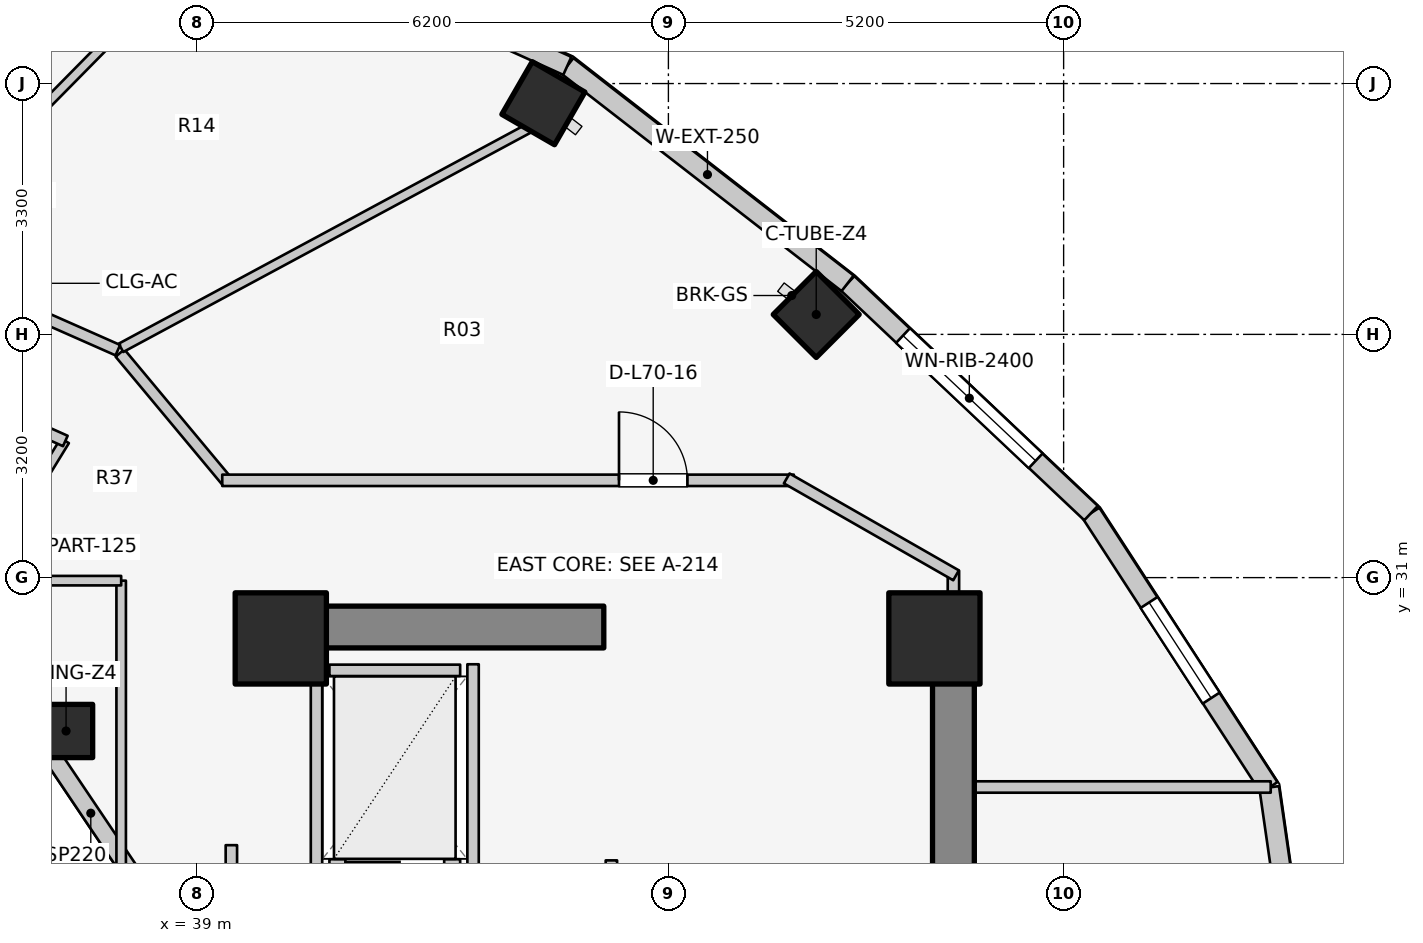
"""IFC4 building model, lengths in metres.
Left out: names, types, materials, properties, quantities, classifications, styles, units other than length and angle.
Written with IfcOpenShell. Run it as: python <this file> out.ifc"""

import sys

from ifc_helpers import new_model, si_unit, direction, frame, frame_2d, origin, origin_2d, place, context, subcontext, project, spatial, rectangle, extrude, element, fill, save


model = new_model("IFC4")
c1 = context("Model", 3, precision=1e-05, world=origin(), true_north=direction((0.0, 1.0)))
c2 = subcontext(c1, "Body", "Model", "MODEL_VIEW")
j1 = project(units=[si_unit("LENGTHUNIT", "METRE"), si_unit("PLANEANGLEUNIT", "RADIAN")], contexts=[c1])
p1 = place(None, origin())
s1 = spatial("IfcSite", under=j1, at=p1, CompositionType="ELEMENT")
p2 = place(p1, origin())
s2 = spatial("IfcBuilding", under=s1, at=p2, CompositionType="ELEMENT")
p3 = place(p2, frame((0.0, 0.0, 229.5)))
s3 = spatial("IfcBuildingStorey", under=s2, at=p3, CompositionType="ELEMENT", Elevation=229.5)
p4 = place(p3, frame((48.95, 17.05, 0.0), z_axis=(0.0, 0.0, 1.0), x_axis=(0.0, 1.0, 0.0)))
e1 = element("IfcWall", 1, at=p4, inside=s3, PredefinedType="SHEAR", context=c2, shape_type="SweptSolid", body=[
    extrude(rectangle(XDim=12.8, YDim=0.55, at=frame_2d((6.4, 0.0))), origin(), (0.0, 0.0, 1.0), 3.1),
])
p5 = place(p3, frame((39.85, 30.35, 0.0), z_axis=(0.0, 0.0, 1.0), x_axis=(1.0, 0.0, 0.0)))
e2 = element("IfcWall", 2, at=p5, inside=s3, PredefinedType="SHEAR", context=c2, shape_type="SweptSolid", body=[
    extrude(rectangle(XDim=4.5, YDim=0.55, at=frame_2d((2.25, 0.0))), origin(), (0.0, 0.0, 1.0), 3.1),
])
for number, where, z_axis, x_axis in (
    (3, (48.7, 30.2, 0.0), (0.0, 0.0, 1.0), (1.0, 0.0, 0.0)),
    (4, (40.1, 30.2, 0.0), (0.0, 0.0, 1.0), (1.0, 0.0, 0.0)),
):
    element("IfcColumn", number, at=place(p3, frame(where, z_axis=z_axis, x_axis=x_axis)), inside=s3, PredefinedType="COLUMN", context=c2, shape_type="SweptSolid", body=[
        extrude(rectangle(XDim=1.2, YDim=1.2, at=origin_2d()), origin(), (0.0, 0.0, 1.0), 3.1),
    ])
p6 = place(p3, frame((37.275, 28.982, 0.0), z_axis=(0.0, 0.0, 1.0), x_axis=(1.0, 0.0, 0.0)))
e5 = element("IfcColumn", 5, at=p6, inside=s3, PredefinedType="COLUMN", context=c2, shape_type="SweptSolid", body=[
    extrude(rectangle(XDim=0.7, YDim=0.7, at=origin_2d()), origin(), (0.0, 0.0, 1.0), 3.1),
])
for number, where, z_axis, x_axis in (
    (6, (47.145, 34.462, 0.0), (0.0, 0.0, 1.0), (0.707, 0.707, 0.0)),
    (7, (43.555, 37.241, 0.0), (0.0, 0.0, 1.0), (0.5, 0.866, 0.0)),
):
    element("IfcColumn", number, at=place(p3, frame(where, z_axis=z_axis, x_axis=x_axis)), inside=s3, PredefinedType="COLUMN", context=c2, shape_type="SweptSolid", body=[
        extrude(rectangle(XDim=0.8, YDim=0.8, at=origin_2d()), origin(), (0.0, 0.0, 1.0), 3.1),
    ])
p7 = place(p3, frame((38.166, 27.06, 0.0), z_axis=(0.0, 0.0, 1.0), x_axis=(-0.558197800898, 0.829707909492, 0.0)))
e8 = element("IfcWall", 8, at=p7, inside=s3, PredefinedType="STANDARD", context=c2, shape_type="SweptSolid", body=[
    extrude(rectangle(XDim=2.027, YDim=0.23, at=frame_2d((1.013, 0.0))), origin(), (0.0, 0.0, 1.0), 2.16),
])
p8 = place(p3, frame((37.035, 28.742, 0.0), z_axis=(0.0, 0.0, 1.0), x_axis=(-0.752576694707, 0.658504607869, 0.0)))
e9 = element("IfcWall", 9, at=p8, inside=s3, PredefinedType="STANDARD", context=c2, shape_type="SweptSolid", body=[
    extrude(rectangle(XDim=1.959, YDim=0.23, at=frame_2d((0.98, 0.0))), origin(), (0.0, 0.0, 1.0), 2.16),
])
p9 = place(p3, frame((53.86, 23.0, 0.0), z_axis=(0.0, 0.0, 1.0), x_axis=(-0.142712754019, 0.989764148593, 0.0)))
e10 = element("IfcWall", 10, at=p9, inside=s3, PredefinedType="STANDARD", context=c2, shape_type="SweptSolid", body=[
    extrude(rectangle(XDim=5.293, YDim=0.26, at=frame_2d((2.646, 0.0))), origin(), (0.0, 0.0, 1.0), 2.85),
])
p10 = place(p9, frame((1.896, 0.0, 0.75)))
e11 = element("IfcOpeningElement", 11, at=p10, cuts=e10, PredefinedType="OPENING", context=c2, shape_type="SweptSolid", body=[
    extrude(rectangle(XDim=1.5, YDim=1.6, at=frame_2d((0.75, 0.8))), frame((0.0, 0.14, 0.0), z_axis=(0.0, -1.0, 0.0), x_axis=(1.0, 0.0, 0.0)), (0.0, 0.0, 1.0), 0.28),
])
p11 = place(p3, frame((53.105, 28.239, 0.0), z_axis=(0.0, 0.0, 1.0), x_axis=(-0.544475908819, 0.838776480784, 0.0)))
e12 = element("IfcWall", 12, at=p11, inside=s3, PredefinedType="STANDARD", context=c2, shape_type="SweptSolid", body=[
    extrude(rectangle(XDim=4.305, YDim=0.26, at=frame_2d((2.152, 0.0))), origin(), (0.0, 0.0, 1.0), 2.85),
])
p12 = place(p11, frame((1.402, 0.0, 0.75)))
e13 = element("IfcOpeningElement", 13, at=p12, cuts=e12, PredefinedType="OPENING", context=c2, shape_type="SweptSolid", body=[
    extrude(rectangle(XDim=1.5, YDim=1.6, at=frame_2d((0.75, 0.8))), frame((0.0, 0.14, 0.0), z_axis=(0.0, -1.0, 0.0), x_axis=(1.0, 0.0, 0.0)), (0.0, 0.0, 1.0), 0.28),
])
p13 = place(p3, frame((50.761, 31.849, 0.0), z_axis=(0.0, 0.0, 1.0), x_axis=(-0.72731899451, 0.686299555752, 0.0)))
e14 = element("IfcWall", 14, at=p13, inside=s3, PredefinedType="STANDARD", context=c2, shape_type="SweptSolid", body=[
    extrude(rectangle(XDim=4.404, YDim=0.26, at=frame_2d((2.202, 0.0))), origin(), (0.0, 0.0, 1.0), 2.85),
])
p14 = place(p13, frame((1.002, 0.0, 0.75)))
e15 = element("IfcOpeningElement", 15, at=p14, cuts=e14, PredefinedType="OPENING", context=c2, shape_type="SweptSolid", body=[
    extrude(rectangle(XDim=2.4, YDim=1.7, at=frame_2d((1.2, 0.85))), frame((0.0, 0.14, 0.0), z_axis=(0.0, -1.0, 0.0), x_axis=(1.0, 0.0, 0.0)), (0.0, 0.0, 1.0), 0.28),
])
p15 = place(p3, frame((47.558, 34.872, 0.0), z_axis=(0.0, 0.0, 1.0), x_axis=(-0.790126214723, 0.612944177563, 0.0)))
e16 = element("IfcWall", 16, at=p15, inside=s3, PredefinedType="STANDARD", context=c2, shape_type="SweptSolid", body=[
    extrude(rectangle(XDim=4.667, YDim=0.26, at=frame_2d((2.333, 0.0))), origin(), (0.0, 0.0, 1.0), 2.85),
])
p16 = place(p3, frame((43.87, 37.733, 0.0), z_axis=(0.0, 0.0, 1.0), x_axis=(-0.911427484938, 0.411460738952, 0.0)))
e17 = element("IfcWall", 17, at=p16, inside=s3, PredefinedType="STANDARD", context=c2, shape_type="SweptSolid", body=[
    extrude(rectangle(XDim=5.296, YDim=0.26, at=frame_2d((2.648, 0.0))), origin(), (0.0, 0.0, 1.0), 2.85),
])
p17 = place(p16, frame((1.898, 0.0, 0.75)))
e18 = element("IfcOpeningElement", 18, at=p17, cuts=e17, PredefinedType="OPENING", context=c2, shape_type="SweptSolid", body=[
    extrude(rectangle(XDim=1.5, YDim=1.6, at=frame_2d((0.75, 0.8))), frame((0.0, 0.14, 0.0), z_axis=(0.0, -1.0, 0.0), x_axis=(1.0, 0.0, 0.0)), (0.0, 0.0, 1.0), 0.28),
])
p18 = place(p3, frame((40.74, 27.22, 0.0), z_axis=(0.0, 0.0, 1.0), x_axis=(1.0, 0.0, 0.0)))
e19 = element("IfcWall", 19, at=p18, inside=s3, PredefinedType="SOLIDWALL", context=c2, shape_type="SweptSolid", body=[
    extrude(rectangle(XDim=1.72, YDim=0.15, at=frame_2d((0.86, 0.0))), origin(), (0.0, 0.0, 1.0), 2.855),
])
p19 = place(p18, frame((0.21, 0.0, 0.0)))
e20 = element("IfcOpeningElement", 20, at=p19, cuts=e19, PredefinedType="OPENING", context=c2, shape_type="SweptSolid", body=[
    extrude(rectangle(XDim=1.3, YDim=2.1, at=frame_2d((0.65, 1.05))), frame((0.0, 0.085, 0.0), z_axis=(0.0, -1.0, 0.0), x_axis=(1.0, 0.0, 0.0)), (0.0, 0.0, 1.0), 0.17),
])
p20 = place(p3, frame((40.74, 29.78, 0.0), z_axis=(0.0, 0.0, 1.0), x_axis=(1.0, 0.0, 0.0)))
e21 = element("IfcWall", 21, at=p20, inside=s3, PredefinedType="SOLIDWALL", context=c2, shape_type="SweptSolid", body=[
    extrude(rectangle(XDim=1.72, YDim=0.15, at=frame_2d((0.86, 0.0))), origin(), (0.0, 0.0, 1.0), 2.855),
])
for number, where, z_axis, x_axis in (
    (22, (40.57, 27.14, 0.0), (0.0, 0.0, 1.0), (0.0, 1.0, 0.0)),
    (23, (42.63, 27.14, 0.0), (0.0, 0.0, 1.0), (0.0, 1.0, 0.0)),
):
    element("IfcWall", number, at=place(p3, frame(where, z_axis=z_axis, x_axis=x_axis)), inside=s3, PredefinedType="SOLIDWALL", context=c2, shape_type="SweptSolid", body=[
        extrude(rectangle(XDim=2.72, YDim=0.15, at=frame_2d((1.36, 0.0))), origin(), (0.0, 0.0, 1.0), 2.855),
    ])
p21 = place(p3, frame((44.45, 24.08, 0.0), z_axis=(0.0, 0.0, 1.0), x_axis=(0.0, 1.0, 0.0)))
e24 = element("IfcWall", 24, at=p21, inside=s3, PredefinedType="PARTITIONING", context=c2, shape_type="SweptSolid", body=[
    extrude(rectangle(XDim=3.2, YDim=0.15, at=frame_2d((1.6, 0.0))), origin(), (0.0, 0.0, 1.0), 2.855),
])
p22 = place(p3, frame((39.45, 24.08, 0.0), z_axis=(0.0, 0.0, 1.0), x_axis=(0.0, 1.0, 0.0)))
e25 = element("IfcWall", 25, at=p22, inside=s3, PredefinedType="PARTITIONING", context=c2, shape_type="SweptSolid", body=[
    extrude(rectangle(XDim=3.4, YDim=0.15, at=frame_2d((1.7, 0.0))), origin(), (0.0, 0.0, 1.0), 2.855),
])
p23 = place(p22, frame((1.894, 0.0, 0.0)))
e26 = element("IfcOpeningElement", 26, at=p23, cuts=e25, PredefinedType="OPENING", context=c2, shape_type="SweptSolid", body=[
    extrude(rectangle(XDim=1.1, YDim=2.1, at=frame_2d((0.55, 1.05))), frame((0.0, 0.085, 0.0), z_axis=(0.0, -1.0, 0.0), x_axis=(1.0, 0.0, 0.0)), (0.0, 0.0, 1.0), 0.17),
])
p24 = place(p3, frame((35.55, 30.015, 0.0), z_axis=(0.0, 0.0, 1.0), x_axis=(0.522763432117, 0.852477796802, 0.0)))
e27 = element("IfcWall", 27, at=p24, inside=s3, PredefinedType="PARTITIONING", context=c2, shape_type="SweptSolid", body=[
    extrude(rectangle(XDim=3.269, YDim=0.125, at=frame_2d((1.635, 0.0))), origin(), (0.0, 0.0, 1.0), 2.376),
])
p25 = place(p3, frame((37.265, 32.798, 0.0), z_axis=(0.0, 0.0, 1.0), x_axis=(-0.913254317828, 0.407389924971, 0.0)))
e28 = element("IfcWall", 28, at=p25, inside=s3, PredefinedType="PARTITIONING", context=c2, shape_type="SweptSolid", body=[
    extrude(rectangle(XDim=2.787, YDim=0.15, at=frame_2d((1.393, 0.0))), origin(), (0.0, 0.0, 1.0), 2.376),
])
p26 = place(p3, frame((38.0, 25.8, 0.0), z_axis=(0.0, 0.0, 1.0), x_axis=(0.0, 1.0, 0.0)))
e29 = element("IfcWall", 29, at=p26, inside=s3, PredefinedType="PARTITIONING", context=c2, shape_type="SweptSolid", body=[
    extrude(rectangle(XDim=5.16, YDim=0.125, at=frame_2d((2.58, 0.0))), origin(), (0.0, 0.0, 1.0), 2.232),
])
p27 = place(p3, frame((35.4, 30.96, 0.0), z_axis=(0.0, 0.0, 1.0), x_axis=(1.0, 0.0, 0.0)))
e30 = element("IfcWall", 30, at=p27, inside=s3, PredefinedType="PARTITIONING", context=c2, shape_type="SweptSolid", body=[
    extrude(rectangle(XDim=2.6, YDim=0.125, at=frame_2d((1.3, 0.0))), origin(), (0.0, 0.0, 1.0), 2.376),
])
p28 = place(p3, frame((48.95, 28.245, 0.0), z_axis=(0.0, 0.0, 1.0), x_axis=(1.0, 0.0, 0.0)))
e31 = element("IfcWall", 31, at=p28, inside=s3, PredefinedType="PARTITIONING", context=c2, shape_type="SweptSolid", body=[
    extrude(rectangle(XDim=4.175, YDim=0.15, at=frame_2d((2.087, 0.0))), origin(), (0.0, 0.0, 1.0), 2.855),
])
p29 = place(p3, frame((48.95, 29.8, 0.0), z_axis=(0.0, 0.0, 1.0), x_axis=(0.0, 1.0, 0.0)))
e32 = element("IfcWall", 32, at=p29, inside=s3, PredefinedType="PARTITIONING", context=c2, shape_type="SweptSolid", body=[
    extrude(rectangle(XDim=1.29, YDim=0.15, at=frame_2d((0.645, 0.0))), origin(), (0.0, 0.0, 1.0), 2.855),
])
p30 = place(p3, frame((37.984, 33.955, 0.0), z_axis=(0.0, 0.0, 1.0), x_axis=(0.64030392053, -0.76812166312, 0.0)))
e33 = element("IfcWall", 33, at=p30, inside=s3, PredefinedType="PARTITIONING", context=c2, shape_type="SweptSolid", body=[
    extrude(rectangle(XDim=2.21, YDim=0.15, at=frame_2d((1.105, 0.0))), origin(), (0.0, 0.0, 1.0), 2.376),
])
p31 = place(p3, frame((39.33, 32.28, 0.0), z_axis=(0.0, 0.0, 1.0), x_axis=(1.0, 0.0, 0.0)))
e34 = element("IfcWall", 34, at=p31, inside=s3, PredefinedType="PARTITIONING", context=c2, shape_type="SweptSolid", body=[
    extrude(rectangle(XDim=7.52, YDim=0.15, at=frame_2d((3.76, 0.0))), origin(), (0.0, 0.0, 1.0), 2.376),
])
p32 = place(p31, frame((5.22, 0.0, 0.0)))
e35 = element("IfcOpeningElement", 35, at=p32, cuts=e34, PredefinedType="OPENING", context=c2, shape_type="SweptSolid", body=[
    extrude(rectangle(XDim=0.9, YDim=2.1, at=frame_2d((0.45, 1.05))), frame((0.0, 0.085, 0.0), z_axis=(0.0, -1.0, 0.0), x_axis=(1.0, 0.0, 0.0)), (0.0, 0.0, 1.0), 0.17),
])
p33 = place(p3, frame((46.757, 32.305, 0.0), z_axis=(0.0, 0.0, 1.0), x_axis=(0.867991349648, -0.496579315857, 0.0)))
e36 = element("IfcWall", 36, at=p33, inside=s3, PredefinedType="PARTITIONING", context=c2, shape_type="SweptSolid", body=[
    extrude(rectangle(XDim=2.567, YDim=0.15, at=frame_2d((1.283, 0.0))), origin(), (0.0, 0.0, 1.0), 2.22),
])
p34 = place(p3, frame((37.997, 34.023, 0.0), z_axis=(0.0, 0.0, 1.0), x_axis=(0.880531534665, 0.473987569943, 0.0)))
e37 = element("IfcWall", 37, at=p34, inside=s3, PredefinedType="PARTITIONING", context=c2, shape_type="SweptSolid", body=[
    extrude(rectangle(XDim=6.096, YDim=0.125, at=frame_2d((3.048, 0.0))), origin(), (0.0, 0.0, 1.0), 2.376),
])
p35 = place(p3, frame((35.118, 35.304, 0.0), z_axis=(0.0, 0.0, 1.0), x_axis=(0.702191571271, 0.711988059756, 0.0)))
e38 = element("IfcWall", 38, at=p35, inside=s3, PredefinedType="PARTITIONING", context=c2, shape_type="SweptSolid", body=[
    extrude(rectangle(XDim=5.184, YDim=0.125, at=frame_2d((2.592, 0.0))), origin(), (0.0, 0.0, 1.0), 2.376),
])
p36 = place(p3, frame((37.956, 33.992, 0.0), z_axis=(0.0, 0.0, 1.0), x_axis=(-0.914642679993, 0.404263240891, 0.0)))
e39 = element("IfcWall", 39, at=p36, inside=s3, PredefinedType="PARTITIONING", context=c2, shape_type="SweptSolid", body=[
    extrude(rectangle(XDim=3.154, YDim=0.15, at=frame_2d((1.577, 0.0))), origin(), (0.0, 0.0, 1.0), 2.376),
])
p37 = place(p36, frame((1.077, 0.0, 0.0)))
e40 = element("IfcOpeningElement", 40, at=p37, cuts=e39, PredefinedType="OPENING", context=c2, shape_type="SweptSolid", body=[
    extrude(rectangle(XDim=1.0, YDim=2.1, at=frame_2d((0.5, 1.05))), frame((0.0, 0.085, 0.0), z_axis=(0.0, -1.0, 0.0), x_axis=(1.0, 0.0, 0.0)), (0.0, 0.0, 1.0), 0.17),
])
p38 = place(p12, origin())
e41 = element("IfcWindow", 41, at=p38, inside=s3, PartitioningType="SINGLE_PANEL", PredefinedType="WINDOW", context=c2, shape_type="SweptSolid", body=[
    extrude(rectangle(XDim=1.5, YDim=1.6, at=frame_2d((0.75, 0.8))), frame((0.0, 0.03, 0.0), z_axis=(0.0, -1.0, 0.0), x_axis=(1.0, 0.0, 0.0)), (0.0, 0.0, 1.0), 0.06),
])
fill(e13, e41)
p39 = place(p14, origin())
e42 = element("IfcWindow", 42, at=p39, inside=s3, PartitioningType="SINGLE_PANEL", PredefinedType="WINDOW", context=c2, shape_type="SweptSolid", body=[
    extrude(rectangle(XDim=2.4, YDim=1.7, at=frame_2d((1.2, 0.85))), frame((0.0, 0.03, 0.0), z_axis=(0.0, -1.0, 0.0), x_axis=(1.0, 0.0, 0.0)), (0.0, 0.0, 1.0), 0.06),
])
fill(e15, e42)
p40 = place(p32, origin())
e43 = element("IfcDoor", 43, at=p40, inside=s3, OperationType="SINGLE_SWING_LEFT", PredefinedType="DOOR", context=c2, shape_type="SweptSolid", body=[
    extrude(rectangle(XDim=0.9, YDim=2.1, at=frame_2d((0.45, 1.05))), frame((0.0, 0.025, 0.0), z_axis=(0.0, -1.0, 0.0), x_axis=(1.0, 0.0, 0.0)), (0.0, 0.0, 1.0), 0.05),
])
fill(e35, e43)
save(model, sys.argv[1])
